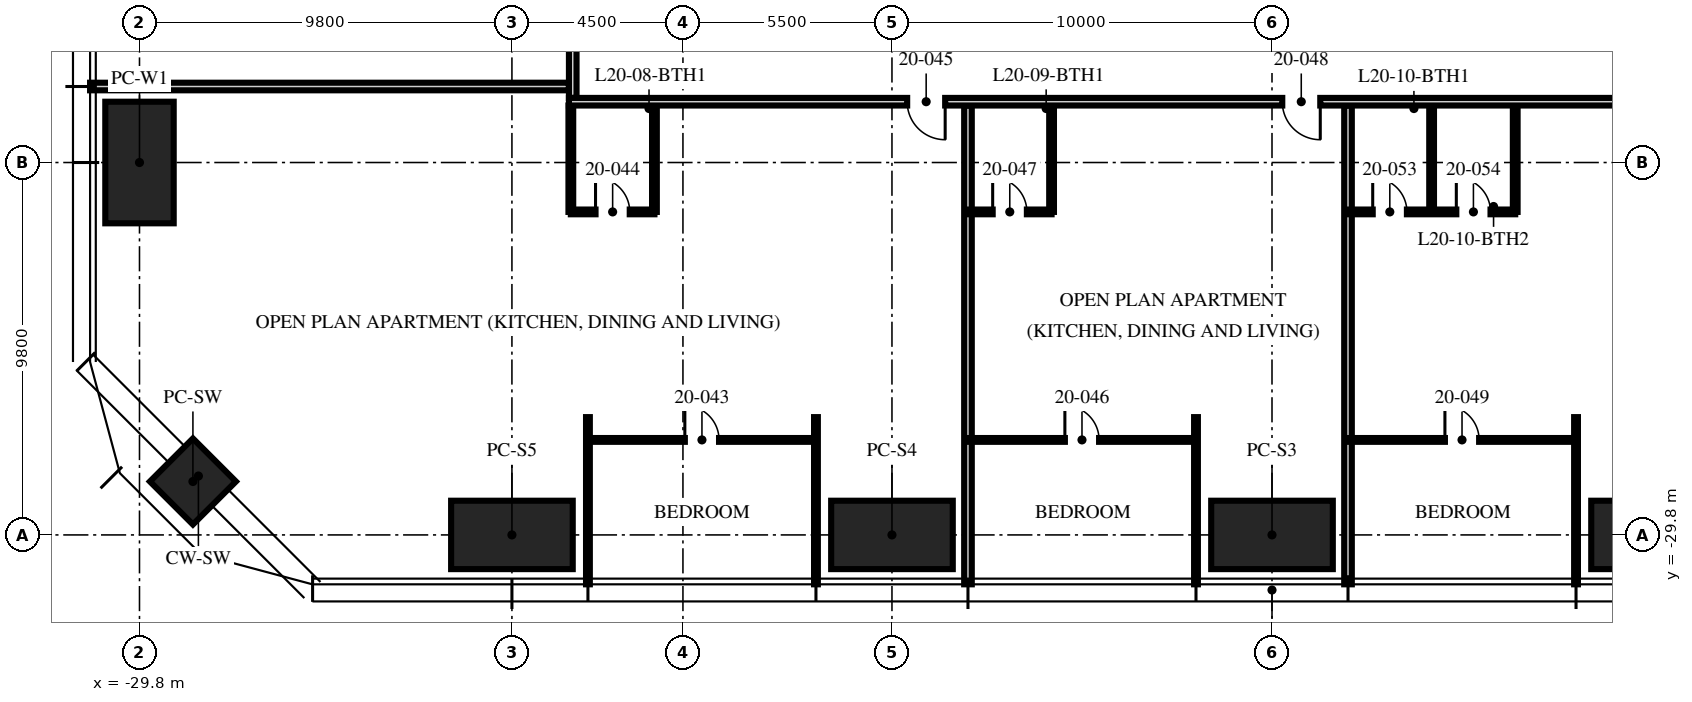
"""IFC4 building model, lengths in metres.
Left out: names, types, materials, properties, quantities, classifications, styles, units other than length and angle.
Written with IfcOpenShell. Run it as: python <this file> out.ifc"""

import sys

from ifc_helpers import new_model, si_unit, direction, frame, frame_2d, origin, origin_2d, place, context, subcontext, project, spatial, rectangle, hollow_rectangle, extrude, element, fill, save


model = new_model("IFC4")
c1 = context("Model", 3, precision=1e-05, world=origin(), true_north=direction((0.0, 1.0)))
c2 = subcontext(c1, "Body", "Model", "MODEL_VIEW")
j1 = project(units=[si_unit("LENGTHUNIT", "METRE"), si_unit("PLANEANGLEUNIT", "RADIAN")], contexts=[c1])
p1 = place(None, origin())
s1 = spatial("IfcSite", under=j1, at=p1, CompositionType="ELEMENT")
p2 = place(p1, origin())
s2 = spatial("IfcBuilding", under=s1, at=p2, CompositionType="ELEMENT")
p3 = place(p2, frame((0.0, 0.0, 81.0)))
s3 = spatial("IfcBuildingStorey", under=s2, at=p3, CompositionType="ELEMENT", Elevation=81.0)
for number, where, z_axis, x_axis in (
    (1, (10.0, -29.8, 0.0), (0.0, 0.0, 1.0), (1.0, 0.0, 0.0)),
    (2, (0.0, -29.8, 0.0), (0.0, 0.0, 1.0), (1.0, 0.0, 0.0)),
    (3, (-10.0, -29.8, 0.0), (0.0, 0.0, 1.0), (1.0, 0.0, 0.0)),
    (4, (-20.0, -29.8, 0.0), (0.0, 0.0, 1.0), (1.0, 0.0, 0.0)),
    (5, (-29.8, -20.0, 0.0), (0.0, 0.0, 1.0), (0.0, 1.0, 0.0)),
):
    element("IfcColumn", number, at=place(p3, frame(where, z_axis=z_axis, x_axis=x_axis)), inside=s3, PredefinedType="COLUMN", context=c2, shape_type="SweptSolid", body=[
        extrude(hollow_rectangle(XDim=3.2, YDim=1.8, WallThickness=0.2, at=origin_2d()), origin(), (0.0, 0.0, 1.0), 3.75),
    ])
p4 = place(p3, frame((-28.394, -28.394, 0.0), z_axis=(0.0, 0.0, 1.0), x_axis=(0.707106781187, -0.707106781187, 0.0)))
e6 = element("IfcColumn", 6, at=p4, inside=s3, PredefinedType="COLUMN", context=c2, shape_type="SweptSolid", body=[
    extrude(hollow_rectangle(XDim=1.6, YDim=1.6, WallThickness=0.1, at=origin_2d()), origin(), (0.0, 0.0, 1.0), 3.75),
])
p5 = place(p3, frame((-18.5, -18.0, 0.0), z_axis=(0.0, 0.0, 1.0), x_axis=(-1.0, 0.0, 0.0)))
e7 = element("IfcWall", 7, at=p5, inside=s3, PredefinedType="PARTITIONING", context=c2, shape_type="SweptSolid", body=[
    extrude(rectangle(XDim=12.6, YDim=0.2, at=frame_2d((6.3, 0.0))), origin(), (0.0, 0.0, 1.0), 2.3),
])
for number, where, z_axis, x_axis in (
    (8, (-18.0, -26.7, 0.0), (0.0, 0.0, 1.0), (0.0, -1.0, 0.0)),
    (9, (-12.0, -26.7, 0.0), (0.0, 0.0, 1.0), (0.0, -1.0, 0.0)),
):
    element("IfcWall", number, at=place(p3, frame(where, z_axis=z_axis, x_axis=x_axis)), inside=s3, PredefinedType="PARTITIONING", context=c2, shape_type="SweptSolid", body=[
        extrude(rectangle(XDim=4.4, YDim=0.1, at=frame_2d((2.2, 0.0))), origin(), (0.0, 0.0, 1.0), 2.71),
    ])
p6 = place(p3, frame((-8.0, -18.5, 0.0), z_axis=(0.0, 0.0, 1.0), x_axis=(0.0, -1.0, 0.0)))
e10 = element("IfcWall", 10, at=p6, inside=s3, PredefinedType="PARTITIONING", context=c2, shape_type="SweptSolid", body=[
    extrude(rectangle(XDim=12.6, YDim=0.2, at=frame_2d((6.3, 0.0))), origin(), (0.0, 0.0, 1.0), 2.71),
])
p7 = place(p3, frame((-2.0, -26.7, 0.0), z_axis=(0.0, 0.0, 1.0), x_axis=(0.0, -1.0, 0.0)))
e11 = element("IfcWall", 11, at=p7, inside=s3, PredefinedType="PARTITIONING", context=c2, shape_type="SweptSolid", body=[
    extrude(rectangle(XDim=4.4, YDim=0.1, at=frame_2d((2.2, 0.0))), origin(), (0.0, 0.0, 1.0), 2.71),
])
p8 = place(p3, frame((2.0, -18.5, 0.0), z_axis=(0.0, 0.0, 1.0), x_axis=(0.0, -1.0, 0.0)))
e12 = element("IfcWall", 12, at=p8, inside=s3, PredefinedType="PARTITIONING", context=c2, shape_type="SweptSolid", body=[
    extrude(rectangle(XDim=12.6, YDim=0.2, at=frame_2d((6.3, 0.0))), origin(), (0.0, 0.0, 1.0), 2.71),
])
p9 = place(p3, frame((8.0, -26.7, 0.0), z_axis=(0.0, 0.0, 1.0), x_axis=(0.0, -1.0, 0.0)))
e13 = element("IfcWall", 13, at=p9, inside=s3, PredefinedType="PARTITIONING", context=c2, shape_type="SweptSolid", body=[
    extrude(rectangle(XDim=4.4, YDim=0.1, at=frame_2d((2.2, 0.0))), origin(), (0.0, 0.0, 1.0), 2.71),
])
p10 = place(p3, frame((-18.0, -27.3, 0.0), z_axis=(0.0, 0.0, 1.0), x_axis=(1.0, 0.0, 0.0)))
e14 = element("IfcWall", 14, at=p10, inside=s3, PredefinedType="PARTITIONING", context=c2, shape_type="SweptSolid", body=[
    extrude(rectangle(XDim=6.0, YDim=0.1, at=frame_2d((3.0, 0.0))), origin(), (0.0, 0.0, 1.0), 2.61),
])
p11 = place(p10, frame((2.55, 0.0, 0.0)))
e15 = element("IfcOpeningElement", 15, at=p11, cuts=e14, PredefinedType="OPENING", context=c2, shape_type="SweptSolid", body=[
    extrude(rectangle(XDim=0.9, YDim=2.1, at=frame_2d((0.45, 1.05))), frame((0.0, 0.06, 0.0), z_axis=(0.0, -1.0, 0.0), x_axis=(1.0, 0.0, 0.0)), (0.0, 0.0, 1.0), 0.12),
])
p12 = place(p3, frame((-18.45, -21.3, 0.0), z_axis=(0.0, 0.0, 1.0), x_axis=(1.0, 0.0, 0.0)))
e16 = element("IfcWall", 16, at=p12, inside=s3, PredefinedType="PARTITIONING", context=c2, shape_type="SweptSolid", body=[
    extrude(rectangle(XDim=2.2, YDim=0.125, at=frame_2d((1.1, 0.0))), origin(), (0.0, 0.0, 1.0), 3.5),
])
p13 = place(p12, frame((0.65, 0.0, 0.0)))
e17 = element("IfcOpeningElement", 17, at=p13, cuts=e16, PredefinedType="OPENING", context=c2, shape_type="SweptSolid", body=[
    extrude(rectangle(XDim=0.9, YDim=2.1, at=frame_2d((0.45, 1.05))), frame((0.0, 0.073, 0.0), z_axis=(0.0, -1.0, 0.0), x_axis=(1.0, 0.0, 0.0)), (0.0, 0.0, 1.0), 0.145),
])
p14 = place(p3, frame((-18.45, -18.5, 0.0), z_axis=(0.0, 0.0, 1.0), x_axis=(0.0, -1.0, 0.0)))
e18 = element("IfcWall", 18, at=p14, inside=s3, PredefinedType="PARTITIONING", context=c2, shape_type="SweptSolid", body=[
    extrude(rectangle(XDim=2.8, YDim=0.125, at=frame_2d((1.4, 0.0))), origin(), (0.0, 0.0, 1.0), 2.3),
])
p15 = place(p3, frame((-16.25, -18.5, 0.0), z_axis=(0.0, 0.0, 1.0), x_axis=(0.0, -1.0, 0.0)))
e19 = element("IfcWall", 19, at=p15, inside=s3, PredefinedType="PARTITIONING", context=c2, shape_type="SweptSolid", body=[
    extrude(rectangle(XDim=2.8, YDim=0.125, at=frame_2d((1.4, 0.0))), origin(), (0.0, 0.0, 1.0), 3.5),
])
p16 = place(p3, frame((-8.0, -27.3, 0.0), z_axis=(0.0, 0.0, 1.0), x_axis=(1.0, 0.0, 0.0)))
e20 = element("IfcWall", 20, at=p16, inside=s3, PredefinedType="PARTITIONING", context=c2, shape_type="SweptSolid", body=[
    extrude(rectangle(XDim=6.0, YDim=0.1, at=frame_2d((3.0, 0.0))), origin(), (0.0, 0.0, 1.0), 2.61),
])
p17 = place(p16, frame((2.55, 0.0, 0.0)))
e21 = element("IfcOpeningElement", 21, at=p17, cuts=e20, PredefinedType="OPENING", context=c2, shape_type="SweptSolid", body=[
    extrude(rectangle(XDim=0.9, YDim=2.1, at=frame_2d((0.45, 1.05))), frame((0.0, 0.06, 0.0), z_axis=(0.0, -1.0, 0.0), x_axis=(1.0, 0.0, 0.0)), (0.0, 0.0, 1.0), 0.12),
])
p18 = place(p3, frame((-8.0, -21.3, 0.0), z_axis=(0.0, 0.0, 1.0), x_axis=(1.0, 0.0, 0.0)))
e22 = element("IfcWall", 22, at=p18, inside=s3, PredefinedType="PARTITIONING", context=c2, shape_type="SweptSolid", body=[
    extrude(rectangle(XDim=2.2, YDim=0.125, at=frame_2d((1.1, 0.0))), origin(), (0.0, 0.0, 1.0), 3.5),
])
p19 = place(p18, frame((0.65, 0.0, 0.0)))
e23 = element("IfcOpeningElement", 23, at=p19, cuts=e22, PredefinedType="OPENING", context=c2, shape_type="SweptSolid", body=[
    extrude(rectangle(XDim=0.9, YDim=2.1, at=frame_2d((0.45, 1.05))), frame((0.0, 0.073, 0.0), z_axis=(0.0, -1.0, 0.0), x_axis=(1.0, 0.0, 0.0)), (0.0, 0.0, 1.0), 0.145),
])
p20 = place(p3, frame((-5.8, -18.5, 0.0), z_axis=(0.0, 0.0, 1.0), x_axis=(0.0, -1.0, 0.0)))
e24 = element("IfcWall", 24, at=p20, inside=s3, PredefinedType="PARTITIONING", context=c2, shape_type="SweptSolid", body=[
    extrude(rectangle(XDim=2.8, YDim=0.125, at=frame_2d((1.4, 0.0))), origin(), (0.0, 0.0, 1.0), 3.5),
])
p21 = place(p3, frame((2.0, -27.3, 0.0), z_axis=(0.0, 0.0, 1.0), x_axis=(1.0, 0.0, 0.0)))
e25 = element("IfcWall", 25, at=p21, inside=s3, PredefinedType="PARTITIONING", context=c2, shape_type="SweptSolid", body=[
    extrude(rectangle(XDim=6.0, YDim=0.1, at=frame_2d((3.0, 0.0))), origin(), (0.0, 0.0, 1.0), 2.61),
])
p22 = place(p21, frame((2.55, 0.0, 0.0)))
e26 = element("IfcOpeningElement", 26, at=p22, cuts=e25, PredefinedType="OPENING", context=c2, shape_type="SweptSolid", body=[
    extrude(rectangle(XDim=0.9, YDim=2.1, at=frame_2d((0.45, 1.05))), frame((0.0, 0.06, 0.0), z_axis=(0.0, -1.0, 0.0), x_axis=(1.0, 0.0, 0.0)), (0.0, 0.0, 1.0), 0.12),
])
p23 = place(p3, frame((2.0, -21.3, 0.0), z_axis=(0.0, 0.0, 1.0), x_axis=(1.0, 0.0, 0.0)))
e27 = element("IfcWall", 27, at=p23, inside=s3, PredefinedType="PARTITIONING", context=c2, shape_type="SweptSolid", body=[
    extrude(rectangle(XDim=4.4, YDim=0.125, at=frame_2d((2.2, 0.0))), origin(), (0.0, 0.0, 1.0), 2.61),
])
p24 = place(p23, frame((0.65, 0.0, 0.0)))
e28 = element("IfcOpeningElement", 28, at=p24, cuts=e27, PredefinedType="OPENING", context=c2, shape_type="SweptSolid", body=[
    extrude(rectangle(XDim=0.9, YDim=2.1, at=frame_2d((0.45, 1.05))), frame((0.0, 0.073, 0.0), z_axis=(0.0, -1.0, 0.0), x_axis=(1.0, 0.0, 0.0)), (0.0, 0.0, 1.0), 0.145),
])
p25 = place(p23, frame((2.85, 0.0, 0.0)))
e29 = element("IfcOpeningElement", 29, at=p25, cuts=e27, PredefinedType="OPENING", context=c2, shape_type="SweptSolid", body=[
    extrude(rectangle(XDim=0.9, YDim=2.1, at=frame_2d((0.45, 1.05))), frame((0.0, 0.073, 0.0), z_axis=(0.0, -1.0, 0.0), x_axis=(1.0, 0.0, 0.0)), (0.0, 0.0, 1.0), 0.145),
])
for number, where, z_axis, x_axis in (
    (30, (4.2, -18.5, 0.0), (0.0, 0.0, 1.0), (0.0, -1.0, 0.0)),
    (31, (6.4, -18.5, 0.0), (0.0, 0.0, 1.0), (0.0, -1.0, 0.0)),
):
    element("IfcWall", number, at=place(p3, frame(where, z_axis=z_axis, x_axis=x_axis)), inside=s3, PredefinedType="PARTITIONING", context=c2, shape_type="SweptSolid", body=[
        extrude(rectangle(XDim=2.8, YDim=0.125, at=frame_2d((1.4, 0.0))), origin(), (0.0, 0.0, 1.0), 3.5),
    ])
p26 = place(p3, frame((-18.4, 6.0, 0.0), z_axis=(0.0, 0.0, 1.0), x_axis=(0.0, -1.0, 0.0)))
e32 = element("IfcWall", 32, at=p26, inside=s3, PredefinedType="PARTITIONING", context=c2, shape_type="SweptSolid", body=[
    extrude(rectangle(XDim=24.3, YDim=0.2, at=frame_2d((12.15, 0.0))), origin(), (0.0, 0.0, 1.0), 2.3),
])
p27 = place(p3, frame((18.5, -18.4, 0.0), z_axis=(0.0, 0.0, 1.0), x_axis=(-1.0, 0.0, 0.0)))
e33 = element("IfcWall", 33, at=p27, inside=s3, PredefinedType="PARTITIONING", context=c2, shape_type="SweptSolid", body=[
    extrude(rectangle(XDim=37.0, YDim=0.2, at=frame_2d((18.5, 0.0))), origin(), (0.0, 0.0, 1.0), 2.3),
])
p28 = place(p27, frame((27.1, 0.0, 0.0)))
e34 = element("IfcOpeningElement", 34, at=p28, cuts=e33, PredefinedType="OPENING", context=c2, shape_type="SweptSolid", body=[
    extrude(rectangle(XDim=1.0, YDim=2.2, at=frame_2d((0.5, 1.1))), frame((0.0, 0.11, 0.0), z_axis=(0.0, -1.0, 0.0), x_axis=(1.0, 0.0, 0.0)), (0.0, 0.0, 1.0), 0.22),
])
p29 = place(p27, frame((17.23, 0.0, 0.0)))
e35 = element("IfcOpeningElement", 35, at=p29, cuts=e33, PredefinedType="OPENING", context=c2, shape_type="SweptSolid", body=[
    extrude(rectangle(XDim=1.0, YDim=2.2, at=frame_2d((0.5, 1.1))), frame((0.0, 0.11, 0.0), z_axis=(0.0, -1.0, 0.0), x_axis=(1.0, 0.0, 0.0)), (0.0, 0.0, 1.0), 0.22),
])
p30 = place(p11, origin())
e36 = element("IfcDoor", 36, at=p30, inside=s3, OperationType="SINGLE_SWING_LEFT", PredefinedType="DOOR", context=c2, shape_type="SweptSolid", body=[
    extrude(rectangle(XDim=0.9, YDim=2.1, at=frame_2d((0.45, 1.05))), frame((0.0, 0.025, 0.0), z_axis=(0.0, -1.0, 0.0), x_axis=(1.0, 0.0, 0.0)), (0.0, 0.0, 1.0), 0.05),
])
fill(e15, e36)
p31 = place(p13, origin())
e37 = element("IfcDoor", 37, at=p31, inside=s3, OperationType="SINGLE_SWING_LEFT", PredefinedType="DOOR", context=c2, shape_type="SweptSolid", body=[
    extrude(rectangle(XDim=0.9, YDim=2.1, at=frame_2d((0.45, 1.05))), frame((0.0, 0.025, 0.0), z_axis=(0.0, -1.0, 0.0), x_axis=(1.0, 0.0, 0.0)), (0.0, 0.0, 1.0), 0.05),
])
fill(e17, e37)
p32 = place(p28, origin())
e38 = element("IfcDoor", 38, at=p32, inside=s3, OperationType="SINGLE_SWING_LEFT", PredefinedType="DOOR", context=c2, shape_type="SweptSolid", body=[
    extrude(rectangle(XDim=1.0, YDim=2.2, at=frame_2d((0.5, 1.1))), frame((0.0, 0.025, 0.0), z_axis=(0.0, -1.0, 0.0), x_axis=(1.0, 0.0, 0.0)), (0.0, 0.0, 1.0), 0.05),
])
fill(e34, e38)
p33 = place(p17, origin())
e39 = element("IfcDoor", 39, at=p33, inside=s3, OperationType="SINGLE_SWING_LEFT", PredefinedType="DOOR", context=c2, shape_type="SweptSolid", body=[
    extrude(rectangle(XDim=0.9, YDim=2.1, at=frame_2d((0.45, 1.05))), frame((0.0, 0.025, 0.0), z_axis=(0.0, -1.0, 0.0), x_axis=(1.0, 0.0, 0.0)), (0.0, 0.0, 1.0), 0.05),
])
fill(e21, e39)
p34 = place(p19, origin())
e40 = element("IfcDoor", 40, at=p34, inside=s3, OperationType="SINGLE_SWING_LEFT", PredefinedType="DOOR", context=c2, shape_type="SweptSolid", body=[
    extrude(rectangle(XDim=0.9, YDim=2.1, at=frame_2d((0.45, 1.05))), frame((0.0, 0.025, 0.0), z_axis=(0.0, -1.0, 0.0), x_axis=(1.0, 0.0, 0.0)), (0.0, 0.0, 1.0), 0.05),
])
fill(e23, e40)
p35 = place(p29, origin())
e41 = element("IfcDoor", 41, at=p35, inside=s3, OperationType="SINGLE_SWING_LEFT", PredefinedType="DOOR", context=c2, shape_type="SweptSolid", body=[
    extrude(rectangle(XDim=1.0, YDim=2.2, at=frame_2d((0.5, 1.1))), frame((0.0, 0.025, 0.0), z_axis=(0.0, -1.0, 0.0), x_axis=(1.0, 0.0, 0.0)), (0.0, 0.0, 1.0), 0.05),
])
fill(e35, e41)
p36 = place(p22, origin())
e42 = element("IfcDoor", 42, at=p36, inside=s3, OperationType="SINGLE_SWING_LEFT", PredefinedType="DOOR", context=c2, shape_type="SweptSolid", body=[
    extrude(rectangle(XDim=0.9, YDim=2.1, at=frame_2d((0.45, 1.05))), frame((0.0, 0.025, 0.0), z_axis=(0.0, -1.0, 0.0), x_axis=(1.0, 0.0, 0.0)), (0.0, 0.0, 1.0), 0.05),
])
fill(e26, e42)
p37 = place(p24, origin())
e43 = element("IfcDoor", 43, at=p37, inside=s3, OperationType="SINGLE_SWING_LEFT", PredefinedType="DOOR", context=c2, shape_type="SweptSolid", body=[
    extrude(rectangle(XDim=0.9, YDim=2.1, at=frame_2d((0.45, 1.05))), frame((0.0, 0.025, 0.0), z_axis=(0.0, -1.0, 0.0), x_axis=(1.0, 0.0, 0.0)), (0.0, 0.0, 1.0), 0.05),
])
fill(e28, e43)
p38 = place(p25, origin())
e44 = element("IfcDoor", 44, at=p38, inside=s3, OperationType="SINGLE_SWING_LEFT", PredefinedType="DOOR", context=c2, shape_type="SweptSolid", body=[
    extrude(rectangle(XDim=0.9, YDim=2.1, at=frame_2d((0.45, 1.05))), frame((0.0, 0.025, 0.0), z_axis=(0.0, -1.0, 0.0), x_axis=(1.0, 0.0, 0.0)), (0.0, 0.0, 1.0), 0.05),
])
fill(e29, e44)
save(model, sys.argv[1])
